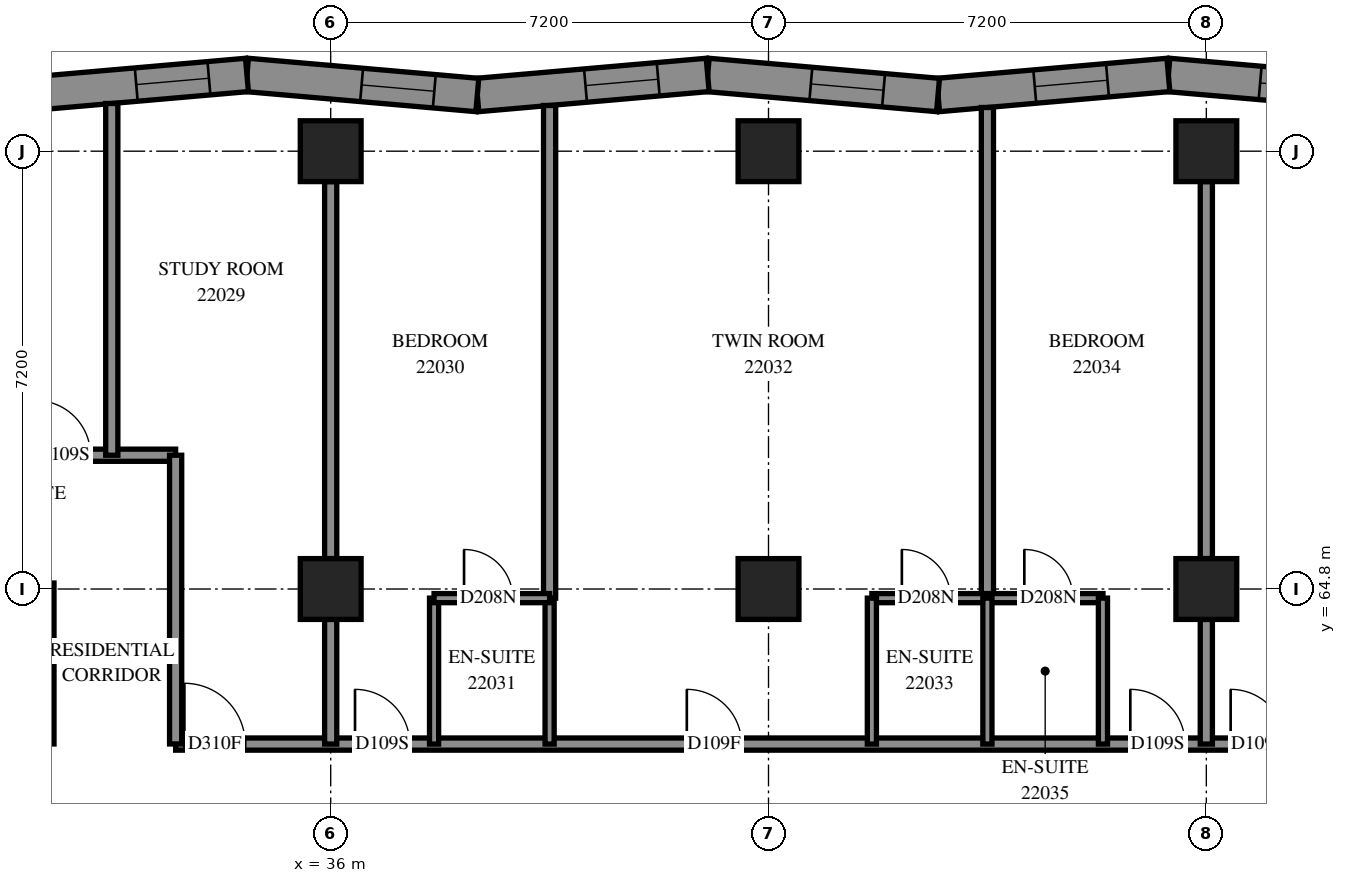
"""IFC4 building model, lengths in metres.
Left out: names, types, materials, properties, quantities, classifications, styles, units other than length and angle.
Written with IfcOpenShell. Run it as: python <this file> out.ifc"""

import sys

from ifc_helpers import new_model, si_unit, direction, frame, frame_2d, origin, origin_2d, place, context, subcontext, project, spatial, polyline, rectangle, outline, extrude, element, fill, save


model = new_model("IFC4")
c1 = context("Model", 3, precision=1e-05, world=origin(), true_north=direction((0.0, 1.0)))
c2 = subcontext(c1, "Body", "Model", "MODEL_VIEW")
j1 = project(units=[si_unit("LENGTHUNIT", "METRE"), si_unit("PLANEANGLEUNIT", "RADIAN")], contexts=[c1])
p1 = place(None, origin())
s1 = spatial("IfcSite", under=j1, at=p1, CompositionType="ELEMENT")
p2 = place(p1, origin())
s2 = spatial("IfcBuilding", under=s1, at=p2, CompositionType="ELEMENT")
p3 = place(p2, frame((0.0, 0.0, 84.6)))
s3 = spatial("IfcBuildingStorey", under=s2, at=p3, CompositionType="ELEMENT", Elevation=84.6)
for number, where, z_axis, x_axis in (
    (1, (36.0, 64.8, 0.0), (0.0, 0.0, 1.0), (1.0, 0.0, 0.0)),
    (2, (36.0, 72.0, 0.0), (0.0, 0.0, 1.0), (1.0, 0.0, 0.0)),
    (3, (43.2, 64.8, 0.0), (0.0, 0.0, 1.0), (1.0, 0.0, 0.0)),
    (4, (43.2, 72.0, 0.0), (0.0, 0.0, 1.0), (1.0, 0.0, 0.0)),
    (5, (50.4, 64.8, 0.0), (0.0, 0.0, 1.0), (1.0, 0.0, 0.0)),
    (6, (50.4, 72.0, 0.0), (0.0, 0.0, 1.0), (1.0, 0.0, 0.0)),
):
    element("IfcColumn", number, at=place(p3, frame(where, z_axis=z_axis, x_axis=x_axis)), inside=s3, PredefinedType="COLUMN", context=c2, shape_type="SweptSolid", body=[
        extrude(rectangle(XDim=1.0, YDim=1.0, at=origin_2d()), origin(), (0.0, 0.0, 1.0), 3.1),
    ])
p4 = place(p3, frame((53.564, 72.924, 0.0), z_axis=(0.0, 0.0, 1.0), x_axis=(-0.9962271558, 0.0867839505, 0.0)))
e7 = element("IfcWall", 7, at=p4, inside=s3, PredefinedType="SOLIDWALL", context=c2, shape_type="SweptSolid", body=[
    extrude(outline(polyline([(0.024, -0.275), (3.827, -0.275), (3.779, 0.275), (-0.024, 0.275), (0.024, -0.275)])), origin(), (0.0, 0.0, 1.0), 3.1),
])
p5 = place(p4, frame((1.088, 0.0, 0.5)))
e8 = element("IfcOpeningElement", 8, at=p5, cuts=e7, PredefinedType="OPENING", context=c2, shape_type="SweptSolid", body=[
    extrude(rectangle(XDim=1.2, YDim=2.45, at=frame_2d((0.6, 1.225))), frame((0.0, 0.285, 0.0), z_axis=(0.0, -1.0, 0.0), x_axis=(1.0, 0.0, 0.0)), (0.0, 0.0, 1.0), 0.57),
])
p6 = place(p3, frame((49.776, 73.254, 0.0), z_axis=(0.0, 0.0, 1.0), x_axis=(-0.9962273538, -0.0867816769, 0.0)))
e9 = element("IfcWall", 9, at=p6, inside=s3, PredefinedType="SOLIDWALL", context=c2, shape_type="SweptSolid", body=[
    extrude(outline(polyline([(-0.024, -0.275), (3.779, -0.275), (3.827, 0.275), (0.024, 0.275), (-0.024, -0.275)])), origin(), (0.0, 0.0, 1.0), 3.1),
])
p7 = place(p6, frame((1.006, 0.0, 0.5)))
e10 = element("IfcOpeningElement", 10, at=p7, cuts=e9, PredefinedType="OPENING", context=c2, shape_type="SweptSolid", body=[
    extrude(rectangle(XDim=1.2, YDim=2.45, at=frame_2d((0.6, 1.225))), frame((0.0, 0.285, 0.0), z_axis=(0.0, -1.0, 0.0), x_axis=(1.0, 0.0, 0.0)), (0.0, 0.0, 1.0), 0.57),
])
p8 = place(p3, frame((45.988, 72.924, 0.0), z_axis=(0.0, 0.0, 1.0), x_axis=(-0.9962273538, 0.0867816769, 0.0)))
e11 = element("IfcWall", 11, at=p8, inside=s3, PredefinedType="SOLIDWALL", context=c2, shape_type="SweptSolid", body=[
    extrude(outline(polyline([(0.024, -0.275), (3.827, -0.275), (3.779, 0.275), (-0.024, 0.275), (0.024, -0.275)])), origin(), (0.0, 0.0, 1.0), 3.1),
])
p9 = place(p8, frame((0.899, 0.0, 0.5)))
e12 = element("IfcOpeningElement", 12, at=p9, cuts=e11, PredefinedType="OPENING", context=c2, shape_type="SweptSolid", body=[
    extrude(rectangle(XDim=1.2, YDim=2.45, at=frame_2d((0.6, 1.225))), frame((0.0, 0.285, 0.0), z_axis=(0.0, -1.0, 0.0), x_axis=(1.0, 0.0, 0.0)), (0.0, 0.0, 1.0), 0.57),
])
p10 = place(p3, frame((42.2, 73.254, 0.0), z_axis=(0.0, 0.0, 1.0), x_axis=(-0.9962273538, -0.0867816769, 0.0)))
e13 = element("IfcWall", 13, at=p10, inside=s3, PredefinedType="SOLIDWALL", context=c2, shape_type="SweptSolid", body=[
    extrude(outline(polyline([(-0.024, -0.275), (3.779, -0.275), (3.827, 0.275), (0.024, 0.275), (-0.024, -0.275)])), origin(), (0.0, 0.0, 1.0), 3.1),
])
p11 = place(p10, frame((0.817, 0.0, 0.5)))
e14 = element("IfcOpeningElement", 14, at=p11, cuts=e13, PredefinedType="OPENING", context=c2, shape_type="SweptSolid", body=[
    extrude(rectangle(XDim=1.2, YDim=2.45, at=frame_2d((0.6, 1.225))), frame((0.0, 0.285, 0.0), z_axis=(0.0, -1.0, 0.0), x_axis=(1.0, 0.0, 0.0)), (0.0, 0.0, 1.0), 0.57),
])
p12 = place(p3, frame((38.411, 72.924, 0.0), z_axis=(0.0, 0.0, 1.0), x_axis=(-0.9962271558, 0.0867839505, 0.0)))
e15 = element("IfcWall", 15, at=p12, inside=s3, PredefinedType="SOLIDWALL", context=c2, shape_type="SweptSolid", body=[
    extrude(outline(polyline([(0.024, -0.275), (3.827, -0.275), (3.779, 0.275), (-0.024, 0.275), (0.024, -0.275)])), origin(), (0.0, 0.0, 1.0), 3.1),
])
p13 = place(p12, frame((0.71, 0.0, 0.5)))
e16 = element("IfcOpeningElement", 16, at=p13, cuts=e15, PredefinedType="OPENING", context=c2, shape_type="SweptSolid", body=[
    extrude(rectangle(XDim=1.2, YDim=2.45, at=frame_2d((0.6, 1.225))), frame((0.0, 0.285, 0.0), z_axis=(0.0, -1.0, 0.0), x_axis=(1.0, 0.0, 0.0)), (0.0, 0.0, 1.0), 0.57),
])
p14 = place(p3, frame((34.623, 73.254, 0.0), z_axis=(0.0, 0.0, 1.0), x_axis=(-0.9962273538, -0.0867816769, 0.0)))
e17 = element("IfcWall", 17, at=p14, inside=s3, PredefinedType="SOLIDWALL", context=c2, shape_type="SweptSolid", body=[
    extrude(outline(polyline([(-0.024, -0.275), (3.779, -0.275), (3.827, 0.275), (0.024, 0.275), (-0.024, -0.275)])), origin(), (0.0, 0.0, 1.0), 3.1),
])
p15 = place(p14, frame((0.628, 0.0, 0.5)))
e18 = element("IfcOpeningElement", 18, at=p15, cuts=e17, PredefinedType="OPENING", context=c2, shape_type="SweptSolid", body=[
    extrude(rectangle(XDim=1.2, YDim=2.45, at=frame_2d((0.6, 1.225))), frame((0.0, 0.285, 0.0), z_axis=(0.0, -1.0, 0.0), x_axis=(1.0, 0.0, 0.0)), (0.0, 0.0, 1.0), 0.57),
])
p16 = place(p3, frame((33.45, 62.25, 0.0), z_axis=(0.0, 0.0, 1.0), x_axis=(1.0, 0.0, 0.0)))
e19 = element("IfcWall", 19, at=p16, inside=s3, PredefinedType="PARTITIONING", context=c2, shape_type="SweptSolid", body=[
    extrude(rectangle(XDim=21.85, YDim=0.2, at=frame_2d((10.925, 0.0))), origin(), (0.0, 0.0, 1.0), 3.1),
])
p17 = place(p16, frame((0.144, 0.0, 0.0)))
e20 = element("IfcOpeningElement", 20, at=p17, cuts=e19, PredefinedType="OPENING", context=c2, shape_type="SweptSolid", body=[
    extrude(rectangle(XDim=1.0, YDim=2.1, at=frame_2d((0.5, 1.05))), frame((0.0, 0.11, 0.0), z_axis=(0.0, -1.0, 0.0), x_axis=(1.0, 0.0, 0.0)), (0.0, 0.0, 1.0), 0.22),
])
p18 = place(p16, frame((2.95, 0.0, 0.0)))
e21 = element("IfcOpeningElement", 21, at=p18, cuts=e19, PredefinedType="OPENING", context=c2, shape_type="SweptSolid", body=[
    extrude(rectangle(XDim=0.9, YDim=2.1, at=frame_2d((0.45, 1.05))), frame((0.0, 0.11, 0.0), z_axis=(0.0, -1.0, 0.0), x_axis=(1.0, 0.0, 0.0)), (0.0, 0.0, 1.0), 0.22),
])
p19 = place(p16, frame((8.407, 0.0, 0.0)))
e22 = element("IfcOpeningElement", 22, at=p19, cuts=e19, PredefinedType="OPENING", context=c2, shape_type="SweptSolid", body=[
    extrude(rectangle(XDim=0.9, YDim=2.1, at=frame_2d((0.45, 1.05))), frame((0.0, 0.11, 0.0), z_axis=(0.0, -1.0, 0.0), x_axis=(1.0, 0.0, 0.0)), (0.0, 0.0, 1.0), 0.22),
])
p20 = place(p16, frame((15.7, 0.0, 0.0)))
e23 = element("IfcOpeningElement", 23, at=p20, cuts=e19, PredefinedType="OPENING", context=c2, shape_type="SweptSolid", body=[
    extrude(rectangle(XDim=0.9, YDim=2.1, at=frame_2d((0.45, 1.05))), frame((0.0, 0.11, 0.0), z_axis=(0.0, -1.0, 0.0), x_axis=(1.0, 0.0, 0.0)), (0.0, 0.0, 1.0), 0.22),
])
p21 = place(p16, frame((17.35, 0.0, 0.0)))
e24 = element("IfcOpeningElement", 24, at=p21, cuts=e19, PredefinedType="OPENING", context=c2, shape_type="SweptSolid", body=[
    extrude(rectangle(XDim=0.9, YDim=2.1, at=frame_2d((0.45, 1.05))), frame((0.0, 0.11, 0.0), z_axis=(0.0, -1.0, 0.0), x_axis=(1.0, 0.0, 0.0)), (0.0, 0.0, 1.0), 0.22),
])
p22 = place(p3, frame((21.602, 67.0, 0.0), z_axis=(0.0, 0.0, 1.0), x_axis=(1.0, 0.0, 0.0)))
e25 = element("IfcWall", 25, at=p22, inside=s3, PredefinedType="PARTITIONING", context=c2, shape_type="SweptSolid", body=[
    extrude(rectangle(XDim=11.848, YDim=0.2, at=frame_2d((5.924, 0.0))), origin(), (0.0, 0.0, 1.0), 3.1),
])
p23 = place(p22, frame((1.791, 0.0, 0.0)))
e26 = element("IfcOpeningElement", 26, at=p23, cuts=e25, PredefinedType="OPENING", context=c2, shape_type="SweptSolid", body=[
    extrude(rectangle(XDim=1.0, YDim=2.1, at=frame_2d((0.5, 1.05))), frame((0.0, 0.11, 0.0), z_axis=(0.0, -1.0, 0.0), x_axis=(1.0, 0.0, 0.0)), (0.0, 0.0, 1.0), 0.22),
])
p24 = place(p22, frame((3.998, 0.0, 0.0)))
e27 = element("IfcOpeningElement", 27, at=p24, cuts=e25, PredefinedType="OPENING", context=c2, shape_type="SweptSolid", body=[
    extrude(rectangle(XDim=0.9, YDim=2.1, at=frame_2d((0.45, 1.05))), frame((0.0, 0.11, 0.0), z_axis=(0.0, -1.0, 0.0), x_axis=(1.0, 0.0, 0.0)), (0.0, 0.0, 1.0), 0.22),
])
p25 = place(p22, frame((9.548, 0.0, 0.0)))
e28 = element("IfcOpeningElement", 28, at=p25, cuts=e25, PredefinedType="OPENING", context=c2, shape_type="SweptSolid", body=[
    extrude(rectangle(XDim=0.9, YDim=2.1, at=frame_2d((0.45, 1.05))), frame((0.0, 0.11, 0.0), z_axis=(0.0, -1.0, 0.0), x_axis=(1.0, 0.0, 0.0)), (0.0, 0.0, 1.0), 0.22),
])
p26 = place(p3, frame((39.6, 64.65, 0.0), z_axis=(0.0, 0.0, 1.0), x_axis=(0.0, 1.0, 0.0)))
e29 = element("IfcWall", 29, at=p26, inside=s3, PredefinedType="PARTITIONING", context=c2, shape_type="SweptSolid", body=[
    extrude(rectangle(XDim=8.101, YDim=0.2, at=frame_2d((4.051, 0.0))), origin(), (0.0, 0.0, 1.0), 3.1),
])
p27 = place(p3, frame((46.8, 64.65, 0.0), z_axis=(0.0, 0.0, 1.0), x_axis=(0.0, 1.0, 0.0)))
e30 = element("IfcWall", 30, at=p27, inside=s3, PredefinedType="PARTITIONING", context=c2, shape_type="SweptSolid", body=[
    extrude(rectangle(XDim=8.069, YDim=0.2, at=frame_2d((4.034, 0.0))), origin(), (0.0, 0.0, 1.0), 3.1),
])
for number, where, z_axis, x_axis in (
    (31, (36.0, 65.3, 0.0), (0.0, 0.0, 1.0), (0.0, 1.0, 0.0)),
    (32, (50.4, 65.3, 0.0), (0.0, 0.0, 1.0), (0.0, 1.0, 0.0)),
):
    element("IfcWall", number, at=place(p3, frame(where, z_axis=z_axis, x_axis=x_axis)), inside=s3, PredefinedType="PARTITIONING", context=c2, shape_type="SweptSolid", body=[
        extrude(rectangle(XDim=6.2, YDim=0.2, at=frame_2d((3.1, 0.0))), origin(), (0.0, 0.0, 1.0), 3.1),
    ])
p28 = place(p3, frame((32.4, 67.0, 0.0), z_axis=(0.0, 0.0, 1.0), x_axis=(0.0, 1.0, 0.0)))
e33 = element("IfcWall", 33, at=p28, inside=s3, PredefinedType="PARTITIONING", context=c2, shape_type="SweptSolid", body=[
    extrude(rectangle(XDim=5.784, YDim=0.2, at=frame_2d((2.892, 0.0))), origin(), (0.0, 0.0, 1.0), 3.1),
])
p29 = place(p3, frame((33.45, 62.252, 0.0), z_axis=(0.0, 0.0, 1.0), x_axis=(0.0, 1.0, 0.0)))
e34 = element("IfcWall", 34, at=p29, inside=s3, PredefinedType="PARTITIONING", context=c2, shape_type="SweptSolid", body=[
    extrude(rectangle(XDim=4.748, YDim=0.2, at=frame_2d((2.374, 0.0))), origin(), (0.0, 0.0, 1.0), 3.1),
])
p30 = place(p3, frame((44.9, 64.65, 0.0), z_axis=(0.0, 0.0, 1.0), x_axis=(1.0, 0.0, 0.0)))
e35 = element("IfcWall", 35, at=p30, inside=s3, PredefinedType="PARTITIONING", context=c2, shape_type="SweptSolid", body=[
    extrude(rectangle(XDim=3.8, YDim=0.15, at=frame_2d((1.9, 0.0))), origin(), (0.0, 0.0, 1.0), 3.1),
])
p31 = place(p30, frame((0.493, 0.0, 0.0)))
e36 = element("IfcOpeningElement", 36, at=p31, cuts=e35, PredefinedType="OPENING", context=c2, shape_type="SweptSolid", body=[
    extrude(rectangle(XDim=0.8, YDim=2.1, at=frame_2d((0.4, 1.05))), frame((0.0, 0.085, 0.0), z_axis=(0.0, -1.0, 0.0), x_axis=(1.0, 0.0, 0.0)), (0.0, 0.0, 1.0), 0.17),
])
p32 = place(p30, frame((2.507, 0.0, 0.0)))
e37 = element("IfcOpeningElement", 37, at=p32, cuts=e35, PredefinedType="OPENING", context=c2, shape_type="SweptSolid", body=[
    extrude(rectangle(XDim=0.8, YDim=2.1, at=frame_2d((0.4, 1.05))), frame((0.0, 0.085, 0.0), z_axis=(0.0, -1.0, 0.0), x_axis=(1.0, 0.0, 0.0)), (0.0, 0.0, 1.0), 0.17),
])
p33 = place(p3, frame((31.35, 62.252, 0.0), z_axis=(0.0, 0.0, 1.0), x_axis=(0.0, 1.0, 0.0)))
e38 = element("IfcWall", 38, at=p33, inside=s3, PredefinedType="PARTITIONING", context=c2, shape_type="SweptSolid", body=[
    extrude(rectangle(XDim=2.646, YDim=0.2, at=frame_2d((1.323, 0.0))), origin(), (0.0, 0.0, 1.0), 3.1),
])
for number, where, z_axis, x_axis in (
    (39, (37.7, 62.25, 0.0), (0.0, 0.0, 1.0), (0.0, 1.0, 0.0)),
    (40, (39.6, 62.25, 0.0), (0.0, 0.0, 1.0), (0.0, 1.0, 0.0)),
    (41, (44.9, 62.25, 0.0), (0.0, 0.0, 1.0), (0.0, 1.0, 0.0)),
    (42, (46.8, 62.25, 0.0), (0.0, 0.0, 1.0), (0.0, 1.0, 0.0)),
    (43, (48.7, 62.25, 0.0), (0.0, 0.0, 1.0), (0.0, 1.0, 0.0)),
):
    element("IfcWall", number, at=place(p3, frame(where, z_axis=z_axis, x_axis=x_axis)), inside=s3, PredefinedType="PARTITIONING", context=c2, shape_type="SweptSolid", body=[
        extrude(rectangle(XDim=2.4, YDim=0.15, at=frame_2d((1.2, 0.0))), origin(), (0.0, 0.0, 1.0), 3.1),
    ])
for number, where, z_axis, x_axis in (
    (44, (36.0, 62.25, 0.0), (0.0, 0.0, 1.0), (0.0, 1.0, 0.0)),
    (45, (50.4, 62.25, 0.0), (0.0, 0.0, 1.0), (0.0, 1.0, 0.0)),
):
    element("IfcWall", number, at=place(p3, frame(where, z_axis=z_axis, x_axis=x_axis)), inside=s3, PredefinedType="PARTITIONING", context=c2, shape_type="SweptSolid", body=[
        extrude(rectangle(XDim=2.05, YDim=0.2, at=frame_2d((1.025, 0.0))), origin(), (0.0, 0.0, 1.0), 3.1),
    ])
p34 = place(p3, frame((37.7, 64.65, 0.0), z_axis=(0.0, 0.0, 1.0), x_axis=(1.0, 0.0, 0.0)))
e46 = element("IfcWall", 46, at=p34, inside=s3, PredefinedType="PARTITIONING", context=c2, shape_type="SweptSolid", body=[
    extrude(rectangle(XDim=1.9, YDim=0.15, at=frame_2d((0.95, 0.0))), origin(), (0.0, 0.0, 1.0), 3.1),
])
p35 = place(p34, frame((0.493, 0.0, 0.0)))
e47 = element("IfcOpeningElement", 47, at=p35, cuts=e46, PredefinedType="OPENING", context=c2, shape_type="SweptSolid", body=[
    extrude(rectangle(XDim=0.8, YDim=2.1, at=frame_2d((0.4, 1.05))), frame((0.0, 0.085, 0.0), z_axis=(0.0, -1.0, 0.0), x_axis=(1.0, 0.0, 0.0)), (0.0, 0.0, 1.0), 0.17),
])
p36 = place(p5, origin())
e48 = element("IfcWindow", 48, at=p36, inside=s3, PartitioningType="SINGLE_PANEL", PredefinedType="WINDOW", context=c2, shape_type="SweptSolid", body=[
    extrude(rectangle(XDim=1.2, YDim=2.45, at=frame_2d((0.6, 1.225))), frame((0.0, 0.155, 0.0), z_axis=(0.0, -1.0, 0.0), x_axis=(1.0, 0.0, 0.0)), (0.0, 0.0, 1.0), 0.06),
])
fill(e8, e48)
p37 = place(p7, origin())
e49 = element("IfcWindow", 49, at=p37, inside=s3, PartitioningType="SINGLE_PANEL", PredefinedType="WINDOW", context=c2, shape_type="SweptSolid", body=[
    extrude(rectangle(XDim=1.2, YDim=2.45, at=frame_2d((0.6, 1.225))), frame((0.0, 0.155, 0.0), z_axis=(0.0, -1.0, 0.0), x_axis=(1.0, 0.0, 0.0)), (0.0, 0.0, 1.0), 0.06),
])
fill(e10, e49)
p38 = place(p9, origin())
e50 = element("IfcWindow", 50, at=p38, inside=s3, PartitioningType="SINGLE_PANEL", PredefinedType="WINDOW", context=c2, shape_type="SweptSolid", body=[
    extrude(rectangle(XDim=1.2, YDim=2.45, at=frame_2d((0.6, 1.225))), frame((0.0, 0.155, 0.0), z_axis=(0.0, -1.0, 0.0), x_axis=(1.0, 0.0, 0.0)), (0.0, 0.0, 1.0), 0.06),
])
fill(e12, e50)
p39 = place(p11, origin())
e51 = element("IfcWindow", 51, at=p39, inside=s3, PartitioningType="SINGLE_PANEL", PredefinedType="WINDOW", context=c2, shape_type="SweptSolid", body=[
    extrude(rectangle(XDim=1.2, YDim=2.45, at=frame_2d((0.6, 1.225))), frame((0.0, 0.155, 0.0), z_axis=(0.0, -1.0, 0.0), x_axis=(1.0, 0.0, 0.0)), (0.0, 0.0, 1.0), 0.06),
])
fill(e14, e51)
p40 = place(p13, origin())
e52 = element("IfcWindow", 52, at=p40, inside=s3, PartitioningType="SINGLE_PANEL", PredefinedType="WINDOW", context=c2, shape_type="SweptSolid", body=[
    extrude(rectangle(XDim=1.2, YDim=2.45, at=frame_2d((0.6, 1.225))), frame((0.0, 0.155, 0.0), z_axis=(0.0, -1.0, 0.0), x_axis=(1.0, 0.0, 0.0)), (0.0, 0.0, 1.0), 0.06),
])
fill(e16, e52)
p41 = place(p15, origin())
e53 = element("IfcWindow", 53, at=p41, inside=s3, PartitioningType="SINGLE_PANEL", PredefinedType="WINDOW", context=c2, shape_type="SweptSolid", body=[
    extrude(rectangle(XDim=1.2, YDim=2.45, at=frame_2d((0.6, 1.225))), frame((0.0, 0.155, 0.0), z_axis=(0.0, -1.0, 0.0), x_axis=(1.0, 0.0, 0.0)), (0.0, 0.0, 1.0), 0.06),
])
fill(e18, e53)
p42 = place(p25, origin())
e54 = element("IfcDoor", 54, at=p42, inside=s3, OperationType="SINGLE_SWING_RIGHT", PredefinedType="DOOR", context=c2, shape_type="SweptSolid", body=[
    extrude(rectangle(XDim=0.9, YDim=2.1, at=frame_2d((0.45, 1.05))), frame((0.0, 0.025, 0.0), z_axis=(0.0, -1.0, 0.0), x_axis=(1.0, 0.0, 0.0)), (0.0, 0.0, 1.0), 0.05),
])
fill(e28, e54)
p43 = place(p17, origin())
e55 = element("IfcDoor", 55, at=p43, inside=s3, OperationType="SINGLE_SWING_LEFT", PredefinedType="DOOR", context=c2, shape_type="SweptSolid", body=[
    extrude(rectangle(XDim=1.0, YDim=2.1, at=frame_2d((0.5, 1.05))), frame((0.0, 0.025, 0.0), z_axis=(0.0, -1.0, 0.0), x_axis=(1.0, 0.0, 0.0)), (0.0, 0.0, 1.0), 0.05),
])
fill(e20, e55)
p44 = place(p18, origin())
e56 = element("IfcDoor", 56, at=p44, inside=s3, OperationType="SINGLE_SWING_RIGHT", PredefinedType="DOOR", context=c2, shape_type="SweptSolid", body=[
    extrude(rectangle(XDim=0.9, YDim=2.1, at=frame_2d((0.45, 1.05))), frame((0.0, 0.025, 0.0), z_axis=(0.0, -1.0, 0.0), x_axis=(1.0, 0.0, 0.0)), (0.0, 0.0, 1.0), 0.05),
])
fill(e21, e56)
p45 = place(p35, origin())
e57 = element("IfcDoor", 57, at=p45, inside=s3, OperationType="SINGLE_SWING_RIGHT", PredefinedType="DOOR", context=c2, shape_type="SweptSolid", body=[
    extrude(rectangle(XDim=0.8, YDim=2.1, at=frame_2d((0.4, 1.05))), frame((0.0, 0.025, 0.0), z_axis=(0.0, -1.0, 0.0), x_axis=(1.0, 0.0, 0.0)), (0.0, 0.0, 1.0), 0.05),
])
fill(e47, e57)
p46 = place(p19, origin())
e58 = element("IfcDoor", 58, at=p46, inside=s3, OperationType="SINGLE_SWING_LEFT", PredefinedType="DOOR", context=c2, shape_type="SweptSolid", body=[
    extrude(rectangle(XDim=0.9, YDim=2.1, at=frame_2d((0.45, 1.05))), frame((0.0, 0.025, 0.0), z_axis=(0.0, -1.0, 0.0), x_axis=(1.0, 0.0, 0.0)), (0.0, 0.0, 1.0), 0.05),
])
fill(e22, e58)
p47 = place(p31, origin())
e59 = element("IfcDoor", 59, at=p47, inside=s3, OperationType="SINGLE_SWING_RIGHT", PredefinedType="DOOR", context=c2, shape_type="SweptSolid", body=[
    extrude(rectangle(XDim=0.8, YDim=2.1, at=frame_2d((0.4, 1.05))), frame((0.0, 0.025, 0.0), z_axis=(0.0, -1.0, 0.0), x_axis=(1.0, 0.0, 0.0)), (0.0, 0.0, 1.0), 0.05),
])
fill(e36, e59)
p48 = place(p20, origin())
e60 = element("IfcDoor", 60, at=p48, inside=s3, OperationType="SINGLE_SWING_LEFT", PredefinedType="DOOR", context=c2, shape_type="SweptSolid", body=[
    extrude(rectangle(XDim=0.9, YDim=2.1, at=frame_2d((0.45, 1.05))), frame((0.0, 0.025, 0.0), z_axis=(0.0, -1.0, 0.0), x_axis=(1.0, 0.0, 0.0)), (0.0, 0.0, 1.0), 0.05),
])
fill(e23, e60)
p49 = place(p32, origin())
e61 = element("IfcDoor", 61, at=p49, inside=s3, OperationType="SINGLE_SWING_RIGHT", PredefinedType="DOOR", context=c2, shape_type="SweptSolid", body=[
    extrude(rectangle(XDim=0.8, YDim=2.1, at=frame_2d((0.4, 1.05))), frame((0.0, 0.025, 0.0), z_axis=(0.0, -1.0, 0.0), x_axis=(1.0, 0.0, 0.0)), (0.0, 0.0, 1.0), 0.05),
])
fill(e37, e61)
p50 = place(p21, origin())
e62 = element("IfcDoor", 62, at=p50, inside=s3, OperationType="SINGLE_SWING_RIGHT", PredefinedType="DOOR", context=c2, shape_type="SweptSolid", body=[
    extrude(rectangle(XDim=0.9, YDim=2.1, at=frame_2d((0.45, 1.05))), frame((0.0, 0.025, 0.0), z_axis=(0.0, -1.0, 0.0), x_axis=(1.0, 0.0, 0.0)), (0.0, 0.0, 1.0), 0.05),
])
fill(e24, e62)
save(model, sys.argv[1])
